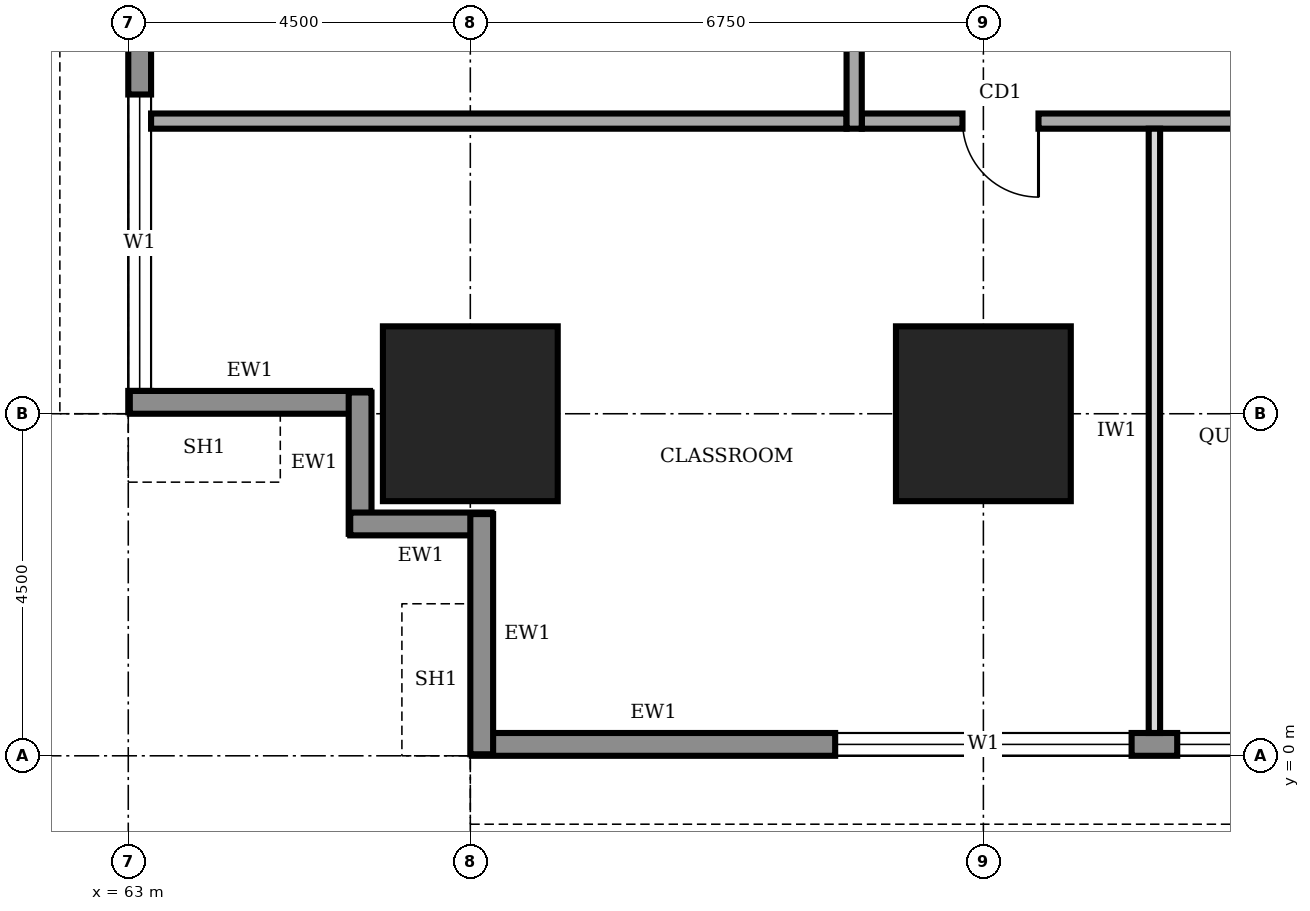
"""IFC4 building model, lengths in metres.
Left out: names, types, materials, properties, quantities, classifications, styles, units other than length and angle.
Written with IfcOpenShell. Run it as: python <this file> out.ifc"""

import sys

from ifc_helpers import new_model, si_unit, direction, frame, frame_2d, origin, origin_2d, place, context, subcontext, project, spatial, rectangle, extrude, element, fill, save


model = new_model("IFC4")
c1 = context("Model", 3, precision=1e-05, world=origin(), true_north=direction((0.0, 1.0)))
c2 = subcontext(c1, "Body", "Model", "MODEL_VIEW")
j1 = project(units=[si_unit("LENGTHUNIT", "METRE"), si_unit("PLANEANGLEUNIT", "RADIAN")], contexts=[c1])
p1 = place(None, origin())
s1 = spatial("IfcSite", under=j1, at=p1, CompositionType="ELEMENT")
p2 = place(p1, origin())
s2 = spatial("IfcBuilding", under=s1, at=p2, CompositionType="ELEMENT")
p3 = place(p2, frame((0.0, 0.0, 37.0)))
s3 = spatial("IfcBuildingStorey", under=s2, at=p3, CompositionType="ELEMENT", Elevation=37.0)
for number, where, z_axis, x_axis in (
    (1, (67.5, 4.5, 0.0), (0.0, 0.0, 1.0), (1.0, 0.0, 0.0)),
    (2, (74.25, 4.5, 0.0), (0.0, 0.0, 1.0), (1.0, 0.0, 0.0)),
):
    element("IfcColumn", number, at=place(p3, frame(where, z_axis=z_axis, x_axis=x_axis)), inside=s3, PredefinedType="COLUMN", context=c2, shape_type="SweptSolid", body=[
        extrude(rectangle(XDim=2.3, YDim=2.3, at=origin_2d()), origin(), (0.0, 0.0, 1.0), 4.0),
    ])
p4 = place(p3, frame((67.52, 0.15, 0.0), z_axis=(0.0, 0.0, 1.0), x_axis=(1.0, 0.0, 0.0)))
e3 = element("IfcWall", 3, at=p4, inside=s3, PredefinedType="STANDARD", context=c2, shape_type="SweptSolid", body=[
    extrude(rectangle(XDim=26.96, YDim=0.3, at=frame_2d((13.48, 0.0))), origin(), (0.0, 0.0, 1.0), 3.75),
])
p5 = place(p4, frame((4.78, 0.0, 0.9)))
e4 = element("IfcOpeningElement", 4, at=p5, cuts=e3, PredefinedType="OPENING", context=c2, shape_type="SweptSolid", body=[
    extrude(rectangle(XDim=3.9, YDim=2.2, at=frame_2d((1.95, 1.1))), frame((0.0, 0.16, 0.0), z_axis=(0.0, -1.0, 0.0), x_axis=(1.0, 0.0, 0.0)), (0.0, 0.0, 1.0), 0.32),
])
p6 = place(p4, frame((9.28, 0.0, 0.9)))
e5 = element("IfcOpeningElement", 5, at=p6, cuts=e3, PredefinedType="OPENING", context=c2, shape_type="SweptSolid", body=[
    extrude(rectangle(XDim=3.9, YDim=2.2, at=frame_2d((1.95, 1.1))), frame((0.0, 0.16, 0.0), z_axis=(0.0, -1.0, 0.0), x_axis=(1.0, 0.0, 0.0)), (0.0, 0.0, 1.0), 0.32),
])
p7 = place(p4, frame((13.78, 0.0, 0.9)))
e6 = element("IfcOpeningElement", 6, at=p7, cuts=e3, PredefinedType="OPENING", context=c2, shape_type="SweptSolid", body=[
    extrude(rectangle(XDim=3.9, YDim=2.2, at=frame_2d((1.95, 1.1))), frame((0.0, 0.16, 0.0), z_axis=(0.0, -1.0, 0.0), x_axis=(1.0, 0.0, 0.0)), (0.0, 0.0, 1.0), 0.32),
])
p8 = place(p4, frame((18.28, 0.0, 0.9)))
e7 = element("IfcOpeningElement", 7, at=p8, cuts=e3, PredefinedType="OPENING", context=c2, shape_type="SweptSolid", body=[
    extrude(rectangle(XDim=3.9, YDim=2.2, at=frame_2d((1.95, 1.1))), frame((0.0, 0.16, 0.0), z_axis=(0.0, -1.0, 0.0), x_axis=(1.0, 0.0, 0.0)), (0.0, 0.0, 1.0), 0.32),
])
p9 = place(p4, frame((22.78, 0.0, 0.9)))
e8 = element("IfcOpeningElement", 8, at=p9, cuts=e3, PredefinedType="OPENING", context=c2, shape_type="SweptSolid", body=[
    extrude(rectangle(XDim=3.9, YDim=2.2, at=frame_2d((1.95, 1.1))), frame((0.0, 0.16, 0.0), z_axis=(0.0, -1.0, 0.0), x_axis=(1.0, 0.0, 0.0)), (0.0, 0.0, 1.0), 0.32),
])
p10 = place(p3, frame((63.15, 35.98, 0.0), z_axis=(0.0, 0.0, 1.0), x_axis=(0.0, -1.0, 0.0)))
e9 = element("IfcWall", 9, at=p10, inside=s3, PredefinedType="STANDARD", context=c2, shape_type="SweptSolid", body=[
    extrude(rectangle(XDim=31.46, YDim=0.3, at=frame_2d((15.73, 0.0))), origin(), (0.0, 0.0, 1.0), 3.75),
])
p11 = place(p10, frame((27.28, 0.0, 0.9)))
e10 = element("IfcOpeningElement", 10, at=p11, cuts=e9, PredefinedType="OPENING", context=c2, shape_type="SweptSolid", body=[
    extrude(rectangle(XDim=3.9, YDim=2.2, at=frame_2d((1.95, 1.1))), frame((0.0, 0.16, 0.0), z_axis=(0.0, -1.0, 0.0), x_axis=(1.0, 0.0, 0.0)), (0.0, 0.0, 1.0), 0.32),
])
p12 = place(p10, frame((22.78, 0.0, 0.9)))
e11 = element("IfcOpeningElement", 11, at=p12, cuts=e9, PredefinedType="OPENING", context=c2, shape_type="SweptSolid", body=[
    extrude(rectangle(XDim=3.9, YDim=2.2, at=frame_2d((1.95, 1.1))), frame((0.0, 0.16, 0.0), z_axis=(0.0, -1.0, 0.0), x_axis=(1.0, 0.0, 0.0)), (0.0, 0.0, 1.0), 0.32),
])
p13 = place(p10, frame((18.28, 0.0, 0.9)))
e12 = element("IfcOpeningElement", 12, at=p13, cuts=e9, PredefinedType="OPENING", context=c2, shape_type="SweptSolid", body=[
    extrude(rectangle(XDim=3.9, YDim=2.2, at=frame_2d((1.95, 1.1))), frame((0.0, 0.16, 0.0), z_axis=(0.0, -1.0, 0.0), x_axis=(1.0, 0.0, 0.0)), (0.0, 0.0, 1.0), 0.32),
])
p14 = place(p10, frame((13.78, 0.0, 0.9)))
e13 = element("IfcOpeningElement", 13, at=p14, cuts=e9, PredefinedType="OPENING", context=c2, shape_type="SweptSolid", body=[
    extrude(rectangle(XDim=3.9, YDim=2.2, at=frame_2d((1.95, 1.1))), frame((0.0, 0.16, 0.0), z_axis=(0.0, -1.0, 0.0), x_axis=(1.0, 0.0, 0.0)), (0.0, 0.0, 1.0), 0.32),
])
p15 = place(p10, frame((9.28, 0.0, 0.9)))
e14 = element("IfcOpeningElement", 14, at=p15, cuts=e9, PredefinedType="OPENING", context=c2, shape_type="SweptSolid", body=[
    extrude(rectangle(XDim=3.9, YDim=2.2, at=frame_2d((1.95, 1.1))), frame((0.0, 0.16, 0.0), z_axis=(0.0, -1.0, 0.0), x_axis=(1.0, 0.0, 0.0)), (0.0, 0.0, 1.0), 0.32),
])
p16 = place(p10, frame((4.78, 0.0, 0.9)))
e15 = element("IfcOpeningElement", 15, at=p16, cuts=e9, PredefinedType="OPENING", context=c2, shape_type="SweptSolid", body=[
    extrude(rectangle(XDim=3.9, YDim=2.2, at=frame_2d((1.95, 1.1))), frame((0.0, 0.16, 0.0), z_axis=(0.0, -1.0, 0.0), x_axis=(1.0, 0.0, 0.0)), (0.0, 0.0, 1.0), 0.32),
])
p17 = place(p3, frame((63.02, 4.65, 0.0), z_axis=(0.0, 0.0, 1.0), x_axis=(1.0, 0.0, 0.0)))
e16 = element("IfcWall", 16, at=p17, inside=s3, PredefinedType="STANDARD", context=c2, shape_type="SweptSolid", body=[
    extrude(rectangle(XDim=3.16, YDim=0.3, at=frame_2d((1.58, 0.0))), origin(), (0.0, 0.0, 1.0), 2.85),
])
for number, where, z_axis, x_axis in (
    (17, (66.05, 4.78, 0.0), (0.0, 0.0, 1.0), (0.0, -1.0, 0.0)),
    (18, (65.92, 3.05, 0.0), (0.0, 0.0, 1.0), (1.0, 0.0, 0.0)),
):
    element("IfcWall", number, at=place(p3, frame(where, z_axis=z_axis, x_axis=x_axis)), inside=s3, PredefinedType="STANDARD", context=c2, shape_type="SweptSolid", body=[
        extrude(rectangle(XDim=1.86, YDim=0.3, at=frame_2d((0.93, 0.0))), origin(), (0.0, 0.0, 1.0), 3.75),
    ])
p18 = place(p3, frame((67.65, 3.18, 0.0), z_axis=(0.0, 0.0, 1.0), x_axis=(0.0, -1.0, 0.0)))
e19 = element("IfcWall", 19, at=p18, inside=s3, PredefinedType="STANDARD", context=c2, shape_type="SweptSolid", body=[
    extrude(rectangle(XDim=3.16, YDim=0.3, at=frame_2d((1.58, 0.0))), origin(), (0.0, 0.0, 1.0), 2.85),
])
p19 = place(p3, frame((72.65, 8.35, 0.0), z_axis=(0.0, 0.0, 1.0), x_axis=(1.0, 0.0, 0.0)))
e20 = element("IfcWall", 20, at=p19, inside=s3, PredefinedType="SOLIDWALL", context=c2, shape_type="SweptSolid", body=[
    extrude(rectangle(XDim=16.9, YDim=0.2, at=frame_2d((8.45, 0.0))), origin(), (0.0, 0.0, 1.0), 3.75),
])
p20 = place(p19, frame((1.325, 0.0, 0.0)))
e21 = element("IfcOpeningElement", 21, at=p20, cuts=e20, PredefinedType="OPENING", context=c2, shape_type="SweptSolid", body=[
    extrude(rectangle(XDim=1.0, YDim=2.1, at=frame_2d((0.5, 1.05))), frame((0.0, 0.11, 0.0), z_axis=(0.0, -1.0, 0.0), x_axis=(1.0, 0.0, 0.0)), (0.0, 0.0, 1.0), 0.22),
])
p21 = place(p19, frame((5.6, 0.0, 0.0)))
e22 = element("IfcOpeningElement", 22, at=p21, cuts=e20, PredefinedType="OPENING", context=c2, shape_type="SweptSolid", body=[
    extrude(rectangle(XDim=1.0, YDim=2.1, at=frame_2d((0.5, 1.05))), frame((0.0, 0.11, 0.0), z_axis=(0.0, -1.0, 0.0), x_axis=(1.0, 0.0, 0.0)), (0.0, 0.0, 1.0), 0.22),
])
p22 = place(p19, frame((11.925, 0.0, 0.0)))
e23 = element("IfcOpeningElement", 23, at=p22, cuts=e20, PredefinedType="OPENING", context=c2, shape_type="SweptSolid", body=[
    extrude(rectangle(XDim=1.4, YDim=2.1, at=frame_2d((0.7, 1.05))), frame((0.0, 0.11, 0.0), z_axis=(0.0, -1.0, 0.0), x_axis=(1.0, 0.0, 0.0)), (0.0, 0.0, 1.0), 0.22),
])
p23 = place(p3, frame((72.55, 32.05, 0.0), z_axis=(0.0, 0.0, 1.0), x_axis=(0.0, -1.0, 0.0)))
e24 = element("IfcWall", 24, at=p23, inside=s3, PredefinedType="SOLIDWALL", context=c2, shape_type="SweptSolid", body=[
    extrude(rectangle(XDim=23.8, YDim=0.2, at=frame_2d((11.9, 0.0))), origin(), (0.0, 0.0, 1.0), 3.75),
])
p24 = place(p23, frame((18.425, 0.0, 0.0)))
e25 = element("IfcOpeningElement", 25, at=p24, cuts=e24, PredefinedType="OPENING", context=c2, shape_type="SweptSolid", body=[
    extrude(rectangle(XDim=1.0, YDim=2.1, at=frame_2d((0.5, 1.05))), frame((0.0, 0.11, 0.0), z_axis=(0.0, -1.0, 0.0), x_axis=(1.0, 0.0, 0.0)), (0.0, 0.0, 1.0), 0.22),
])
p25 = place(p23, frame((6.225, 0.0, 0.0)))
e26 = element("IfcOpeningElement", 26, at=p25, cuts=e24, PredefinedType="OPENING", context=c2, shape_type="SweptSolid", body=[
    extrude(rectangle(XDim=1.4, YDim=2.1, at=frame_2d((0.7, 1.05))), frame((0.0, 0.11, 0.0), z_axis=(0.0, -1.0, 0.0), x_axis=(1.0, 0.0, 0.0)), (0.0, 0.0, 1.0), 0.22),
])
p26 = place(p3, frame((63.3, 8.35, 0.0), z_axis=(0.0, 0.0, 1.0), x_axis=(1.0, 0.0, 0.0)))
e27 = element("IfcWall", 27, at=p26, inside=s3, PredefinedType="SOLIDWALL", context=c2, shape_type="SweptSolid", body=[
    extrude(rectangle(XDim=9.15, YDim=0.2, at=frame_2d((4.575, 0.0))), origin(), (0.0, 0.0, 1.0), 3.75),
])
p27 = place(p3, frame((76.5, 0.3, 0.0), z_axis=(0.0, 0.0, 1.0), x_axis=(0.0, 1.0, 0.0)))
e28 = element("IfcWall", 28, at=p27, inside=s3, PredefinedType="PARTITIONING", context=c2, shape_type="SweptSolid", body=[
    extrude(rectangle(XDim=7.95, YDim=0.15, at=frame_2d((3.975, 0.0))), origin(), (0.0, 0.0, 1.0), 3.75),
])
p28 = place(p5, origin())
e29 = element("IfcWindow", 29, at=p28, inside=s3, PartitioningType="SINGLE_PANEL", PredefinedType="WINDOW", context=c2, shape_type="SweptSolid", body=[
    extrude(rectangle(XDim=3.9, YDim=2.2, at=frame_2d((1.95, 1.1))), frame((0.0, 0.03, 0.0), z_axis=(0.0, -1.0, 0.0), x_axis=(1.0, 0.0, 0.0)), (0.0, 0.0, 1.0), 0.06),
])
fill(e4, e29)
p29 = place(p6, origin())
e30 = element("IfcWindow", 30, at=p29, inside=s3, PartitioningType="SINGLE_PANEL", PredefinedType="WINDOW", context=c2, shape_type="SweptSolid", body=[
    extrude(rectangle(XDim=3.9, YDim=2.2, at=frame_2d((1.95, 1.1))), frame((0.0, 0.03, 0.0), z_axis=(0.0, -1.0, 0.0), x_axis=(1.0, 0.0, 0.0)), (0.0, 0.0, 1.0), 0.06),
])
fill(e5, e30)
p30 = place(p11, origin())
e31 = element("IfcWindow", 31, at=p30, inside=s3, PartitioningType="SINGLE_PANEL", PredefinedType="WINDOW", context=c2, shape_type="SweptSolid", body=[
    extrude(rectangle(XDim=3.9, YDim=2.2, at=frame_2d((1.95, 1.1))), frame((0.0, 0.03, 0.0), z_axis=(0.0, -1.0, 0.0), x_axis=(1.0, 0.0, 0.0)), (0.0, 0.0, 1.0), 0.06),
])
fill(e10, e31)
p31 = place(p20, frame((1.0, 0.0, 0.0), z_axis=(0.0, 0.0, 1.0), x_axis=(-1.0, 0.0, 0.0)))
e32 = element("IfcDoor", 32, at=p31, inside=s3, OperationType="SINGLE_SWING_LEFT", PredefinedType="DOOR", context=c2, shape_type="SweptSolid", body=[
    extrude(rectangle(XDim=1.0, YDim=2.1, at=frame_2d((0.5, 1.05))), frame((0.0, 0.025, 0.0), z_axis=(0.0, -1.0, 0.0), x_axis=(1.0, 0.0, 0.0)), (0.0, 0.0, 1.0), 0.05),
])
fill(e21, e32)
save(model, sys.argv[1])
